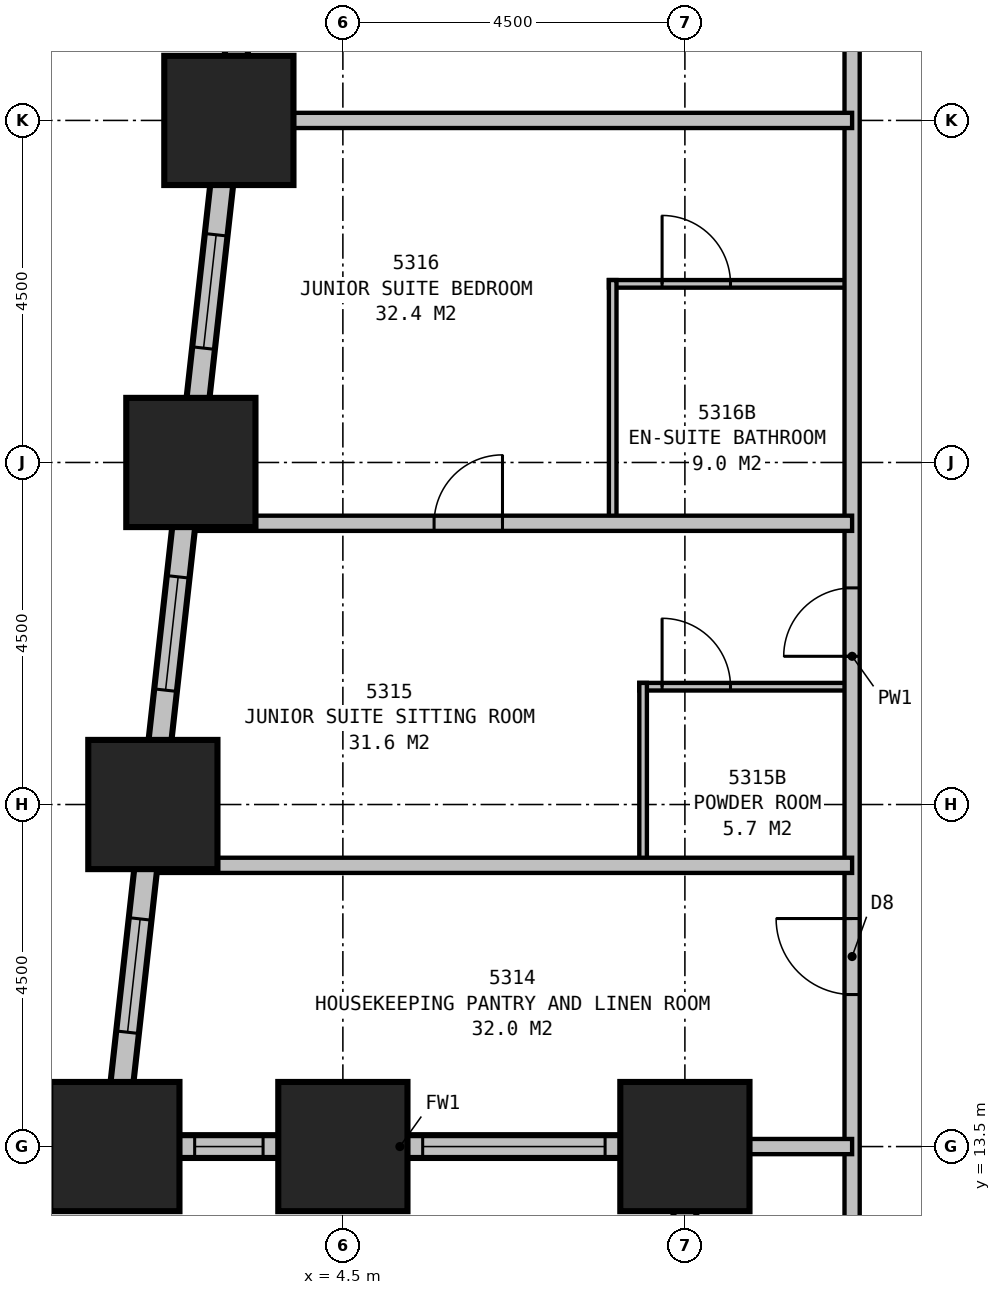
"""IFC4 building model, lengths in metres.
Left out: names, types, materials, properties, quantities, classifications, styles, units other than length and angle.
Written with IfcOpenShell. Run it as: python <this file> out.ifc"""

import sys

from ifc_helpers import new_model, si_unit, direction, frame, frame_2d, origin, origin_2d, place, context, subcontext, project, spatial, rectangle, extrude, element, fill, save


model = new_model("IFC4")
c1 = context("Model", 3, precision=1e-05, world=origin(), true_north=direction((0.0, 1.0)))
c2 = subcontext(c1, "Body", "Model", "MODEL_VIEW")
j1 = project(units=[si_unit("LENGTHUNIT", "METRE"), si_unit("PLANEANGLEUNIT", "RADIAN")], contexts=[c1])
p1 = place(None, origin())
s1 = spatial("IfcSite", under=j1, at=p1, CompositionType="ELEMENT")
p2 = place(p1, origin())
s2 = spatial("IfcBuilding", under=s1, at=p2, CompositionType="ELEMENT")
p3 = place(p2, frame((0.0, 0.0, 204.4)))
s3 = spatial("IfcBuildingStorey", under=s2, at=p3, CompositionType="ELEMENT", Elevation=204.4)
for number, where, z_axis, x_axis in (
    (1, (1.5, 13.5, 0.0), (0.0, 0.0, 1.0), (1.0, 0.0, 0.0)),
    (2, (4.5, 13.5, 0.0), (0.0, 0.0, 1.0), (1.0, 0.0, 0.0)),
    (3, (9.0, 13.5, 0.0), (0.0, 0.0, 1.0), (1.0, 0.0, 0.0)),
    (4, (3.0, 27.0, 0.0), (0.0, 0.0, 1.0), (1.0, 0.0, 0.0)),
    (5, (2.5, 22.5, 0.0), (0.0, 0.0, 1.0), (1.0, 0.0, 0.0)),
    (6, (2.0, 18.0, 0.0), (0.0, 0.0, 1.0), (1.0, 0.0, 0.0)),
):
    element("IfcColumn", number, at=place(p3, frame(where, z_axis=z_axis, x_axis=x_axis)), inside=s3, PredefinedType="COLUMN", context=c2, shape_type="SweptSolid", body=[
        extrude(rectangle(XDim=1.7, YDim=1.7, at=origin_2d()), origin(), (0.0, 0.0, 1.0), 3.5),
    ])
p4 = place(p3, frame((1.35, 13.5, 0.0), z_axis=(0.0, 0.0, 1.0), x_axis=(1.0, 0.0, 0.0)))
e7 = element("IfcWall", 7, at=p4, inside=s3, PredefinedType="STANDARD", context=c2, shape_type="SweptSolid", body=[
    extrude(rectangle(XDim=7.8, YDim=0.3, at=frame_2d((3.9, 0.0))), origin(), (0.0, 0.0, 1.0), 2.25),
])
p5 = place(p4, frame((1.2, 0.0, 0.5)))
e8 = element("IfcOpeningElement", 8, at=p5, cuts=e7, PredefinedType="OPENING", context=c2, shape_type="SweptSolid", body=[
    extrude(rectangle(XDim=0.9, YDim=1.6, at=frame_2d((0.45, 0.8))), frame((0.0, 0.16, 0.0), z_axis=(0.0, -1.0, 0.0), x_axis=(1.0, 0.0, 0.0)), (0.0, 0.0, 1.0), 0.32),
])
p6 = place(p4, frame((4.2, 0.0, 0.5)))
e9 = element("IfcOpeningElement", 9, at=p6, cuts=e7, PredefinedType="OPENING", context=c2, shape_type="SweptSolid", body=[
    extrude(rectangle(XDim=2.4, YDim=1.6, at=frame_2d((1.2, 0.8))), frame((0.0, 0.16, 0.0), z_axis=(0.0, -1.0, 0.0), x_axis=(1.0, 0.0, 0.0)), (0.0, 0.0, 1.0), 0.32),
])
p7 = place(p3, frame((9.0, 13.65, 0.0), z_axis=(0.0, 0.0, 1.0), x_axis=(0.0, -1.0, 0.0)))
e10 = element("IfcWall", 10, at=p7, inside=s3, PredefinedType="STANDARD", context=c2, shape_type="SweptSolid", body=[
    extrude(rectangle(XDim=13.8, YDim=0.3, at=frame_2d((6.9, 0.0))), origin(), (0.0, 0.0, 1.0), 2.25),
])
p8 = place(p7, frame((1.2, 0.0, 0.5)))
e11 = element("IfcOpeningElement", 11, at=p8, cuts=e10, PredefinedType="OPENING", context=c2, shape_type="SweptSolid", body=[
    extrude(rectangle(XDim=2.4, YDim=1.6, at=frame_2d((1.2, 0.8))), frame((0.0, 0.16, 0.0), z_axis=(0.0, -1.0, 0.0), x_axis=(1.0, 0.0, 0.0)), (0.0, 0.0, 1.0), 0.32),
])
p9 = place(p7, frame((5.7, 0.0, 0.5)))
e12 = element("IfcOpeningElement", 12, at=p9, cuts=e10, PredefinedType="OPENING", context=c2, shape_type="SweptSolid", body=[
    extrude(rectangle(XDim=2.4, YDim=1.6, at=frame_2d((1.2, 0.8))), frame((0.0, 0.16, 0.0), z_axis=(0.0, -1.0, 0.0), x_axis=(1.0, 0.0, 0.0)), (0.0, 0.0, 1.0), 0.32),
])
p10 = place(p7, frame((10.2, 0.0, 0.5)))
e13 = element("IfcOpeningElement", 13, at=p10, cuts=e10, PredefinedType="OPENING", context=c2, shape_type="SweptSolid", body=[
    extrude(rectangle(XDim=2.4, YDim=1.6, at=frame_2d((1.2, 0.8))), frame((0.0, 0.16, 0.0), z_axis=(0.0, -1.0, 0.0), x_axis=(1.0, 0.0, 0.0)), (0.0, 0.0, 1.0), 0.32),
])
p11 = place(p3, frame((4.017, 36.149, 0.0), z_axis=(0.0, 0.0, 1.0), x_axis=(-0.110433862387, -0.993883475081, 0.0)))
e14 = element("IfcWall", 14, at=p11, inside=s3, PredefinedType="STANDARD", context=c2, shape_type="SweptSolid", body=[
    extrude(rectangle(XDim=22.939, YDim=0.3, at=frame_2d((11.469, 0.0))), origin(), (0.0, 0.0, 1.0), 2.25),
])
p12 = place(p11, frame((1.664, 0.0, 0.5)))
e15 = element("IfcOpeningElement", 15, at=p12, cuts=e14, PredefinedType="OPENING", context=c2, shape_type="SweptSolid", body=[
    extrude(rectangle(XDim=1.5, YDim=1.6, at=frame_2d((0.75, 0.8))), frame((0.0, 0.16, 0.0), z_axis=(0.0, -1.0, 0.0), x_axis=(1.0, 0.0, 0.0)), (0.0, 0.0, 1.0), 0.32),
])
p13 = place(p11, frame((6.192, 0.0, 0.5)))
e16 = element("IfcOpeningElement", 16, at=p13, cuts=e14, PredefinedType="OPENING", context=c2, shape_type="SweptSolid", body=[
    extrude(rectangle(XDim=1.5, YDim=1.6, at=frame_2d((0.75, 0.8))), frame((0.0, 0.16, 0.0), z_axis=(0.0, -1.0, 0.0), x_axis=(1.0, 0.0, 0.0)), (0.0, 0.0, 1.0), 0.32),
])
p14 = place(p11, frame((10.719, 0.0, 0.5)))
e17 = element("IfcOpeningElement", 17, at=p14, cuts=e14, PredefinedType="OPENING", context=c2, shape_type="SweptSolid", body=[
    extrude(rectangle(XDim=1.5, YDim=1.6, at=frame_2d((0.75, 0.8))), frame((0.0, 0.16, 0.0), z_axis=(0.0, -1.0, 0.0), x_axis=(1.0, 0.0, 0.0)), (0.0, 0.0, 1.0), 0.32),
])
p15 = place(p11, frame((15.247, 0.0, 0.5)))
e18 = element("IfcOpeningElement", 18, at=p15, cuts=e14, PredefinedType="OPENING", context=c2, shape_type="SweptSolid", body=[
    extrude(rectangle(XDim=1.5, YDim=1.6, at=frame_2d((0.75, 0.8))), frame((0.0, 0.16, 0.0), z_axis=(0.0, -1.0, 0.0), x_axis=(1.0, 0.0, 0.0)), (0.0, 0.0, 1.0), 0.32),
])
p16 = place(p11, frame((19.775, 0.0, 0.5)))
e19 = element("IfcOpeningElement", 19, at=p16, cuts=e14, PredefinedType="OPENING", context=c2, shape_type="SweptSolid", body=[
    extrude(rectangle(XDim=1.5, YDim=1.6, at=frame_2d((0.75, 0.8))), frame((0.0, 0.16, 0.0), z_axis=(0.0, -1.0, 0.0), x_axis=(1.0, 0.0, 0.0)), (0.0, 0.0, 1.0), 0.32),
])
p17 = place(p3, frame((11.2, 10.6, 0.0), z_axis=(0.0, 0.0, 1.0), x_axis=(0.0, 1.0, 0.0)))
e20 = element("IfcWall", 20, at=p17, inside=s3, PredefinedType="PARTITIONING", context=c2, shape_type="SweptSolid", body=[
    extrude(rectangle(XDim=18.7, YDim=0.2, at=frame_2d((9.35, 0.0))), origin(), (0.0, 0.0, 1.0), 3.25),
])
p18 = place(p17, frame((4.9, 0.0, 0.0)))
e21 = element("IfcOpeningElement", 21, at=p18, cuts=e20, PredefinedType="OPENING", context=c2, shape_type="SweptSolid", body=[
    extrude(rectangle(XDim=1.0, YDim=2.1, at=frame_2d((0.5, 1.05))), frame((0.0, 0.11, 0.0), z_axis=(0.0, -1.0, 0.0), x_axis=(1.0, 0.0, 0.0)), (0.0, 0.0, 1.0), 0.22),
])
p19 = place(p17, frame((9.35, 0.0, 0.0)))
e22 = element("IfcOpeningElement", 22, at=p19, cuts=e20, PredefinedType="OPENING", context=c2, shape_type="SweptSolid", body=[
    extrude(rectangle(XDim=0.9, YDim=2.1, at=frame_2d((0.45, 1.05))), frame((0.0, 0.11, 0.0), z_axis=(0.0, -1.0, 0.0), x_axis=(1.0, 0.0, 0.0)), (0.0, 0.0, 1.0), 0.22),
])
p20 = place(p3, frame((11.2, 17.2, 0.0), z_axis=(0.0, 0.0, 1.0), x_axis=(-1.0, 0.0, 0.0)))
e23 = element("IfcWall", 23, at=p20, inside=s3, PredefinedType="PARTITIONING", context=c2, shape_type="SweptSolid", body=[
    extrude(rectangle(XDim=9.288, YDim=0.2, at=frame_2d((4.644, 0.0))), origin(), (0.0, 0.0, 1.0), 3.25),
])
p21 = place(p3, frame((11.2, 21.7, 0.0), z_axis=(0.0, 0.0, 1.0), x_axis=(-1.0, 0.0, 0.0)))
e24 = element("IfcWall", 24, at=p21, inside=s3, PredefinedType="PARTITIONING", context=c2, shape_type="SweptSolid", body=[
    extrude(rectangle(XDim=8.788, YDim=0.2, at=frame_2d((4.394, 0.0))), origin(), (0.0, 0.0, 1.0), 3.25),
])
p22 = place(p21, frame((5.5, 0.0, 0.0), z_axis=(0.0, 0.0, 1.0), x_axis=(-1.0, 0.0, 0.0)))
e25 = element("IfcOpeningElement", 25, at=p22, cuts=e24, PredefinedType="OPENING", context=c2, shape_type="SweptSolid", body=[
    extrude(rectangle(XDim=0.9, YDim=2.1, at=frame_2d((0.45, 1.05))), frame((0.0, 0.11, 0.0), z_axis=(0.0, -1.0, 0.0), x_axis=(1.0, 0.0, 0.0)), (0.0, 0.0, 1.0), 0.22),
])
p23 = place(p3, frame((8.45, 17.2, 0.0), z_axis=(0.0, 0.0, 1.0), x_axis=(0.0, 1.0, 0.0)))
e26 = element("IfcWall", 26, at=p23, inside=s3, PredefinedType="PLUMBINGWALL", context=c2, shape_type="SweptSolid", body=[
    extrude(rectangle(XDim=2.4, YDim=0.1, at=frame_2d((1.2, 0.0))), origin(), (0.0, 0.0, 1.0), 3.25),
])
p24 = place(p3, frame((11.2, 19.55, 0.0), z_axis=(0.0, 0.0, 1.0), x_axis=(-1.0, 0.0, 0.0)))
e27 = element("IfcWall", 27, at=p24, inside=s3, PredefinedType="PLUMBINGWALL", context=c2, shape_type="SweptSolid", body=[
    extrude(rectangle(XDim=2.8, YDim=0.1, at=frame_2d((1.4, 0.0))), origin(), (0.0, 0.0, 1.0), 3.25),
])
p25 = place(p24, frame((2.5, 0.0, 0.0), z_axis=(0.0, 0.0, 1.0), x_axis=(-1.0, 0.0, 0.0)))
e28 = element("IfcOpeningElement", 28, at=p25, cuts=e27, PredefinedType="OPENING", context=c2, shape_type="SweptSolid", body=[
    extrude(rectangle(XDim=0.9, YDim=2.1, at=frame_2d((0.45, 1.05))), frame((0.0, 0.06, 0.0), z_axis=(0.0, -1.0, 0.0), x_axis=(1.0, 0.0, 0.0)), (0.0, 0.0, 1.0), 0.12),
])
p26 = place(p3, frame((8.05, 21.7, 0.0), z_axis=(0.0, 0.0, 1.0), x_axis=(0.0, 1.0, 0.0)))
e29 = element("IfcWall", 29, at=p26, inside=s3, PredefinedType="PLUMBINGWALL", context=c2, shape_type="SweptSolid", body=[
    extrude(rectangle(XDim=3.2, YDim=0.1, at=frame_2d((1.6, 0.0))), origin(), (0.0, 0.0, 1.0), 3.25),
])
p27 = place(p3, frame((11.2, 24.85, 0.0), z_axis=(0.0, 0.0, 1.0), x_axis=(-1.0, 0.0, 0.0)))
e30 = element("IfcWall", 30, at=p27, inside=s3, PredefinedType="PLUMBINGWALL", context=c2, shape_type="SweptSolid", body=[
    extrude(rectangle(XDim=3.2, YDim=0.1, at=frame_2d((1.6, 0.0))), origin(), (0.0, 0.0, 1.0), 3.25),
])
p28 = place(p27, frame((2.5, 0.0, 0.0), z_axis=(0.0, 0.0, 1.0), x_axis=(-1.0, 0.0, 0.0)))
e31 = element("IfcOpeningElement", 31, at=p28, cuts=e30, PredefinedType="OPENING", context=c2, shape_type="SweptSolid", body=[
    extrude(rectangle(XDim=0.9, YDim=2.1, at=frame_2d((0.45, 1.05))), frame((0.0, 0.06, 0.0), z_axis=(0.0, -1.0, 0.0), x_axis=(1.0, 0.0, 0.0)), (0.0, 0.0, 1.0), 0.12),
])
p29 = place(p3, frame((11.2, 13.5, 0.0), z_axis=(0.0, 0.0, 1.0), x_axis=(-1.0, 0.0, 0.0)))
e32 = element("IfcWall", 32, at=p29, inside=s3, PredefinedType="PARTITIONING", context=c2, shape_type="SweptSolid", body=[
    extrude(rectangle(XDim=2.2, YDim=0.2, at=frame_2d((1.1, 0.0))), origin(), (0.0, 0.0, 1.0), 1.95),
])
p30 = place(p3, frame((11.2, 27.0, 0.0), z_axis=(0.0, 0.0, 1.0), x_axis=(-1.0, 0.0, 0.0)))
e33 = element("IfcWall", 33, at=p30, inside=s3, PredefinedType="PARTITIONING", context=c2, shape_type="SweptSolid", body=[
    extrude(rectangle(XDim=7.977, YDim=0.2, at=frame_2d((3.988, 0.0))), origin(), (0.0, 0.0, 1.0), 1.95),
])
p31 = place(p5, origin())
e34 = element("IfcWindow", 34, at=p31, inside=s3, PartitioningType="SINGLE_PANEL", PredefinedType="WINDOW", context=c2, shape_type="SweptSolid", body=[
    extrude(rectangle(XDim=0.9, YDim=1.6, at=frame_2d((0.45, 0.8))), frame((0.0, 0.03, 0.0), z_axis=(0.0, -1.0, 0.0), x_axis=(1.0, 0.0, 0.0)), (0.0, 0.0, 1.0), 0.06),
])
fill(e8, e34)
p32 = place(p6, origin())
e35 = element("IfcWindow", 35, at=p32, inside=s3, PartitioningType="SINGLE_PANEL", PredefinedType="WINDOW", context=c2, shape_type="SweptSolid", body=[
    extrude(rectangle(XDim=2.4, YDim=1.6, at=frame_2d((1.2, 0.8))), frame((0.0, 0.03, 0.0), z_axis=(0.0, -1.0, 0.0), x_axis=(1.0, 0.0, 0.0)), (0.0, 0.0, 1.0), 0.06),
])
fill(e9, e35)
p33 = place(p14, origin())
e36 = element("IfcWindow", 36, at=p33, inside=s3, PartitioningType="SINGLE_PANEL", PredefinedType="WINDOW", context=c2, shape_type="SweptSolid", body=[
    extrude(rectangle(XDim=1.5, YDim=1.6, at=frame_2d((0.75, 0.8))), frame((0.0, 0.03, 0.0), z_axis=(0.0, -1.0, 0.0), x_axis=(1.0, 0.0, 0.0)), (0.0, 0.0, 1.0), 0.06),
])
fill(e17, e36)
p34 = place(p15, origin())
e37 = element("IfcWindow", 37, at=p34, inside=s3, PartitioningType="SINGLE_PANEL", PredefinedType="WINDOW", context=c2, shape_type="SweptSolid", body=[
    extrude(rectangle(XDim=1.5, YDim=1.6, at=frame_2d((0.75, 0.8))), frame((0.0, 0.03, 0.0), z_axis=(0.0, -1.0, 0.0), x_axis=(1.0, 0.0, 0.0)), (0.0, 0.0, 1.0), 0.06),
])
fill(e18, e37)
p35 = place(p16, origin())
e38 = element("IfcWindow", 38, at=p35, inside=s3, PartitioningType="SINGLE_PANEL", PredefinedType="WINDOW", context=c2, shape_type="SweptSolid", body=[
    extrude(rectangle(XDim=1.5, YDim=1.6, at=frame_2d((0.75, 0.8))), frame((0.0, 0.03, 0.0), z_axis=(0.0, -1.0, 0.0), x_axis=(1.0, 0.0, 0.0)), (0.0, 0.0, 1.0), 0.06),
])
fill(e19, e38)
p36 = place(p18, origin())
e39 = element("IfcDoor", 39, at=p36, inside=s3, OperationType="SINGLE_SWING_RIGHT", PredefinedType="DOOR", context=c2, shape_type="SweptSolid", body=[
    extrude(rectangle(XDim=1.0, YDim=2.1, at=frame_2d((0.5, 1.05))), frame((0.0, 0.025, 0.0), z_axis=(0.0, -1.0, 0.0), x_axis=(1.0, 0.0, 0.0)), (0.0, 0.0, 1.0), 0.05),
])
fill(e21, e39)
p37 = place(p19, origin())
e40 = element("IfcDoor", 40, at=p37, inside=s3, OperationType="SINGLE_SWING_LEFT", PredefinedType="DOOR", context=c2, shape_type="SweptSolid", body=[
    extrude(rectangle(XDim=0.9, YDim=2.1, at=frame_2d((0.45, 1.05))), frame((0.0, 0.025, 0.0), z_axis=(0.0, -1.0, 0.0), x_axis=(1.0, 0.0, 0.0)), (0.0, 0.0, 1.0), 0.05),
])
fill(e22, e40)
p38 = place(p22, origin())
e41 = element("IfcDoor", 41, at=p38, inside=s3, OperationType="SINGLE_SWING_RIGHT", PredefinedType="DOOR", context=c2, shape_type="SweptSolid", body=[
    extrude(rectangle(XDim=0.9, YDim=2.1, at=frame_2d((0.45, 1.05))), frame((0.0, 0.025, 0.0), z_axis=(0.0, -1.0, 0.0), x_axis=(1.0, 0.0, 0.0)), (0.0, 0.0, 1.0), 0.05),
])
fill(e25, e41)
p39 = place(p25, origin())
e42 = element("IfcDoor", 42, at=p39, inside=s3, OperationType="SINGLE_SWING_LEFT", PredefinedType="DOOR", context=c2, shape_type="SweptSolid", body=[
    extrude(rectangle(XDim=0.9, YDim=2.1, at=frame_2d((0.45, 1.05))), frame((0.0, 0.025, 0.0), z_axis=(0.0, -1.0, 0.0), x_axis=(1.0, 0.0, 0.0)), (0.0, 0.0, 1.0), 0.05),
])
fill(e28, e42)
p40 = place(p28, origin())
e43 = element("IfcDoor", 43, at=p40, inside=s3, OperationType="SINGLE_SWING_LEFT", PredefinedType="DOOR", context=c2, shape_type="SweptSolid", body=[
    extrude(rectangle(XDim=0.9, YDim=2.1, at=frame_2d((0.45, 1.05))), frame((0.0, 0.025, 0.0), z_axis=(0.0, -1.0, 0.0), x_axis=(1.0, 0.0, 0.0)), (0.0, 0.0, 1.0), 0.05),
])
fill(e31, e43)
save(model, sys.argv[1])
